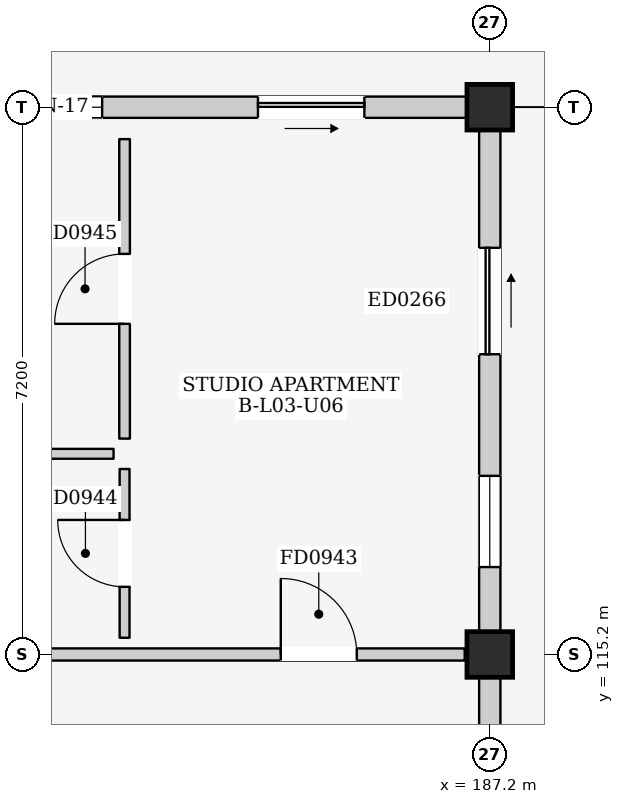
"""IFC4 building model, lengths in metres.
Left out: names, types, materials, properties, quantities, classifications, styles, units other than length and angle.
Written with IfcOpenShell. Run it as: python <this file> out.ifc"""

import sys

from ifc_helpers import new_model, si_unit, direction, frame, frame_2d, origin, origin_2d, place, context, subcontext, project, spatial, rectangle, extrude, element, fill, save


model = new_model("IFC4")
c1 = context("Model", 3, precision=1e-05, world=origin(), true_north=direction((0.0, 1.0)))
c2 = subcontext(c1, "Body", "Model", "MODEL_VIEW")
j1 = project(units=[si_unit("LENGTHUNIT", "METRE"), si_unit("PLANEANGLEUNIT", "RADIAN")], contexts=[c1])
p1 = place(None, origin())
s1 = spatial("IfcSite", under=j1, at=p1, CompositionType="ELEMENT")
p2 = place(p1, origin())
s2 = spatial("IfcBuilding", under=s1, at=p2, CompositionType="ELEMENT")
p3 = place(p2, frame((0.0, 0.0, 12.2)))
s3 = spatial("IfcBuildingStorey", under=s2, at=p3, CompositionType="ELEMENT", Elevation=12.2)
for number, where, z_axis, x_axis in (
    (1, (187.2, 115.2, 0.0), (0.0, 0.0, 1.0), (1.0, 0.0, 0.0)),
    (2, (187.2, 122.4, 0.0), (0.0, 0.0, 1.0), (1.0, 0.0, 0.0)),
):
    element("IfcColumn", number, at=place(p3, frame(where, z_axis=z_axis, x_axis=x_axis)), inside=s3, PredefinedType="COLUMN", context=c2, shape_type="SweptSolid", body=[
        extrude(rectangle(XDim=0.6, YDim=0.6, at=origin_2d()), origin(), (0.0, 0.0, 1.0), 3.2),
    ])
p4 = place(p3, frame((187.2, 108.3, 0.0), z_axis=(0.0, 0.0, 1.0), x_axis=(0.0, 1.0, 0.0)))
e3 = element("IfcWall", 3, at=p4, inside=s3, PredefinedType="ELEMENTEDWALL", context=c2, shape_type="SweptSolid", body=[
    extrude(rectangle(XDim=6.6, YDim=0.28, at=frame_2d((3.3, 0.0))), origin(), (0.0, 0.0, 1.0), 2.445),
])
p5 = place(p4, frame((3.65, 0.0, 0.0)))
e4 = element("IfcOpeningElement", 4, at=p5, cuts=e3, PredefinedType="OPENING", context=c2, shape_type="SweptSolid", body=[
    extrude(rectangle(XDim=1.4, YDim=2.1, at=frame_2d((0.7, 1.05))), frame((0.0, 0.155, 0.0), z_axis=(0.0, -1.0, 0.0), x_axis=(1.0, 0.0, 0.0)), (0.0, 0.0, 1.0), 0.31),
])
p6 = place(p3, frame((180.3, 122.4, 0.0), z_axis=(0.0, 0.0, 1.0), x_axis=(1.0, 0.0, 0.0)))
e5 = element("IfcWall", 5, at=p6, inside=s3, PredefinedType="ELEMENTEDWALL", context=c2, shape_type="SweptSolid", body=[
    extrude(rectangle(XDim=6.6, YDim=0.28, at=frame_2d((3.3, 0.0))), origin(), (0.0, 0.0, 1.0), 2.445),
])
p7 = place(p6, frame((3.85, 0.0, 0.0)))
e6 = element("IfcOpeningElement", 6, at=p7, cuts=e5, PredefinedType="OPENING", context=c2, shape_type="SweptSolid", body=[
    extrude(rectangle(XDim=1.4, YDim=2.1, at=frame_2d((0.7, 1.05))), frame((0.0, 0.155, 0.0), z_axis=(0.0, -1.0, 0.0), x_axis=(1.0, 0.0, 0.0)), (0.0, 0.0, 1.0), 0.31),
])
p8 = place(p6, frame((0.55, 0.0, 0.9)))
e7 = element("IfcOpeningElement", 7, at=p8, cuts=e5, PredefinedType="OPENING", context=c2, shape_type="SweptSolid", body=[
    extrude(rectangle(XDim=1.25, YDim=1.3, at=frame_2d((0.625, 0.65))), frame((0.0, 0.155, 0.0), z_axis=(0.0, -1.0, 0.0), x_axis=(1.0, 0.0, 0.0)), (0.0, 0.0, 1.0), 0.31),
])
p9 = place(p3, frame((187.2, 115.5, 0.0), z_axis=(0.0, 0.0, 1.0), x_axis=(0.0, 1.0, 0.0)))
e8 = element("IfcWall", 8, at=p9, inside=s3, PredefinedType="ELEMENTEDWALL", context=c2, shape_type="SweptSolid", body=[
    extrude(rectangle(XDim=6.6, YDim=0.28, at=frame_2d((3.3, 0.0))), origin(), (0.0, 0.0, 1.0), 2.445),
])
p10 = place(p9, frame((3.65, 0.0, 0.0)))
e9 = element("IfcOpeningElement", 9, at=p10, cuts=e8, PredefinedType="OPENING", context=c2, shape_type="SweptSolid", body=[
    extrude(rectangle(XDim=1.4, YDim=2.1, at=frame_2d((0.7, 1.05))), frame((0.0, 0.155, 0.0), z_axis=(0.0, -1.0, 0.0), x_axis=(1.0, 0.0, 0.0)), (0.0, 0.0, 1.0), 0.31),
])
p11 = place(p9, frame((0.85, 0.0, 0.95)))
e10 = element("IfcOpeningElement", 10, at=p11, cuts=e8, PredefinedType="OPENING", context=c2, shape_type="SweptSolid", body=[
    extrude(rectangle(XDim=1.2, YDim=1.35, at=frame_2d((0.6, 0.675))), frame((0.0, 0.155, 0.0), z_axis=(0.0, -1.0, 0.0), x_axis=(1.0, 0.0, 0.0)), (0.0, 0.0, 1.0), 0.31),
])
p12 = place(p3, frame((180.33, 115.2, 0.0), z_axis=(0.0, 0.0, 1.0), x_axis=(1.0, 0.0, 0.0)))
e11 = element("IfcWall", 11, at=p12, inside=s3, PredefinedType="PARTITIONING", context=c2, shape_type="SweptSolid", body=[
    extrude(rectangle(XDim=6.54, YDim=0.16, at=frame_2d((3.27, 0.0))), origin(), (0.0, 0.0, 1.0), 2.365),
])
p13 = place(p12, frame((4.12, 0.0, 0.0)))
e12 = element("IfcOpeningElement", 12, at=p13, cuts=e11, PredefinedType="OPENING", context=c2, shape_type="SweptSolid", body=[
    extrude(rectangle(XDim=1.0, YDim=2.15, at=frame_2d((0.5, 1.075))), frame((0.0, 0.095, 0.0), z_axis=(0.0, -1.0, 0.0), x_axis=(1.0, 0.0, 0.0)), (0.0, 0.0, 1.0), 0.19),
])
p14 = place(p3, frame((180.2, 117.84, 0.0), z_axis=(0.0, 0.0, 1.0), x_axis=(1.0, 0.0, 0.0)))
e13 = element("IfcWall", 13, at=p14, inside=s3, PredefinedType="PARTITIONING", context=c2, shape_type="SweptSolid", body=[
    extrude(rectangle(XDim=2.05, YDim=0.13, at=frame_2d((1.025, 0.0))), origin(), (0.0, 0.0, 1.0), 2.98),
])
p15 = place(p3, frame((182.395, 115.42, 0.0), z_axis=(0.0, 0.0, 1.0), x_axis=(0.0, 1.0, 0.0)))
e14 = element("IfcWall", 14, at=p15, inside=s3, PredefinedType="PARTITIONING", context=c2, shape_type="SweptSolid", body=[
    extrude(rectangle(XDim=2.22, YDim=0.13, at=frame_2d((1.11, 0.0))), origin(), (0.0, 0.0, 1.0), 2.98),
])
p16 = place(p15, frame((0.67, 0.0, 0.0)))
e15 = element("IfcOpeningElement", 15, at=p16, cuts=e14, PredefinedType="OPENING", context=c2, shape_type="SweptSolid", body=[
    extrude(rectangle(XDim=0.88, YDim=2.1, at=frame_2d((0.44, 1.05))), frame((0.0, 0.08, 0.0), z_axis=(0.0, -1.0, 0.0), x_axis=(1.0, 0.0, 0.0)), (0.0, 0.0, 1.0), 0.16),
])
p17 = place(p3, frame((182.395, 118.04, 0.0), z_axis=(0.0, 0.0, 1.0), x_axis=(0.0, 1.0, 0.0)))
e16 = element("IfcWall", 16, at=p17, inside=s3, PredefinedType="PARTITIONING", context=c2, shape_type="SweptSolid", body=[
    extrude(rectangle(XDim=3.94, YDim=0.14, at=frame_2d((1.97, 0.0))), origin(), (0.0, 0.0, 1.0), 2.98),
])
p18 = place(p17, frame((1.51, 0.0, 0.0)))
e17 = element("IfcOpeningElement", 17, at=p18, cuts=e16, PredefinedType="OPENING", context=c2, shape_type="SweptSolid", body=[
    extrude(rectangle(XDim=0.92, YDim=2.1, at=frame_2d((0.46, 1.05))), frame((0.0, 0.085, 0.0), z_axis=(0.0, -1.0, 0.0), x_axis=(1.0, 0.0, 0.0)), (0.0, 0.0, 1.0), 0.17),
])
p19 = place(p7, frame((1.4, 0.0, 0.0), z_axis=(0.0, 0.0, 1.0), x_axis=(-1.0, 0.0, 0.0)))
e18 = element("IfcDoor", 18, at=p19, inside=s3, OperationType="SLIDING_TO_RIGHT", PredefinedType="DOOR", context=c2, shape_type="SweptSolid", body=[
    extrude(rectangle(XDim=1.4, YDim=2.1, at=frame_2d((0.7, 1.05))), frame((0.0, 0.025, 0.0), z_axis=(0.0, -1.0, 0.0), x_axis=(1.0, 0.0, 0.0)), (0.0, 0.0, 1.0), 0.05),
])
fill(e6, e18)
p20 = place(p8, origin())
e19 = element("IfcWindow", 19, at=p20, inside=s3, PartitioningType="SINGLE_PANEL", PredefinedType="WINDOW", context=c2, shape_type="SweptSolid", body=[
    extrude(rectangle(XDim=1.25, YDim=1.3, at=frame_2d((0.625, 0.65))), frame((0.0, 0.03, 0.0), z_axis=(0.0, -1.0, 0.0), x_axis=(1.0, 0.0, 0.0)), (0.0, 0.0, 1.0), 0.06),
])
fill(e7, e19)
p21 = place(p10, frame((1.4, 0.0, 0.0), z_axis=(0.0, 0.0, 1.0), x_axis=(-1.0, 0.0, 0.0)))
e20 = element("IfcDoor", 20, at=p21, inside=s3, OperationType="SLIDING_TO_RIGHT", PredefinedType="DOOR", context=c2, shape_type="SweptSolid", body=[
    extrude(rectangle(XDim=1.4, YDim=2.1, at=frame_2d((0.7, 1.05))), frame((0.0, 0.025, 0.0), z_axis=(0.0, -1.0, 0.0), x_axis=(1.0, 0.0, 0.0)), (0.0, 0.0, 1.0), 0.05),
])
fill(e9, e20)
p22 = place(p11, origin())
e21 = element("IfcWindow", 21, at=p22, inside=s3, PartitioningType="SINGLE_PANEL", PredefinedType="WINDOW", context=c2, shape_type="SweptSolid", body=[
    extrude(rectangle(XDim=1.2, YDim=1.35, at=frame_2d((0.6, 0.675))), frame((0.0, 0.03, 0.0), z_axis=(0.0, -1.0, 0.0), x_axis=(1.0, 0.0, 0.0)), (0.0, 0.0, 1.0), 0.06),
])
fill(e10, e21)
p23 = place(p13, origin())
e22 = element("IfcDoor", 22, at=p23, inside=s3, OperationType="SINGLE_SWING_LEFT", PredefinedType="DOOR", context=c2, shape_type="SweptSolid", body=[
    extrude(rectangle(XDim=1.0, YDim=2.15, at=frame_2d((0.5, 1.075))), frame((0.0, 0.025, 0.0), z_axis=(0.0, -1.0, 0.0), x_axis=(1.0, 0.0, 0.0)), (0.0, 0.0, 1.0), 0.05),
])
fill(e12, e22)
p24 = place(p16, origin())
e23 = element("IfcDoor", 23, at=p24, inside=s3, OperationType="SINGLE_SWING_RIGHT", PredefinedType="DOOR", context=c2, shape_type="SweptSolid", body=[
    extrude(rectangle(XDim=0.88, YDim=2.1, at=frame_2d((0.44, 1.05))), frame((0.0, 0.025, 0.0), z_axis=(0.0, -1.0, 0.0), x_axis=(1.0, 0.0, 0.0)), (0.0, 0.0, 1.0), 0.05),
])
fill(e15, e23)
p25 = place(p18, origin())
e24 = element("IfcDoor", 24, at=p25, inside=s3, OperationType="SINGLE_SWING_LEFT", PredefinedType="DOOR", context=c2, shape_type="SweptSolid", body=[
    extrude(rectangle(XDim=0.92, YDim=2.1, at=frame_2d((0.46, 1.05))), frame((0.0, 0.025, 0.0), z_axis=(0.0, -1.0, 0.0), x_axis=(1.0, 0.0, 0.0)), (0.0, 0.0, 1.0), 0.05),
])
fill(e17, e24)
save(model, sys.argv[1])
